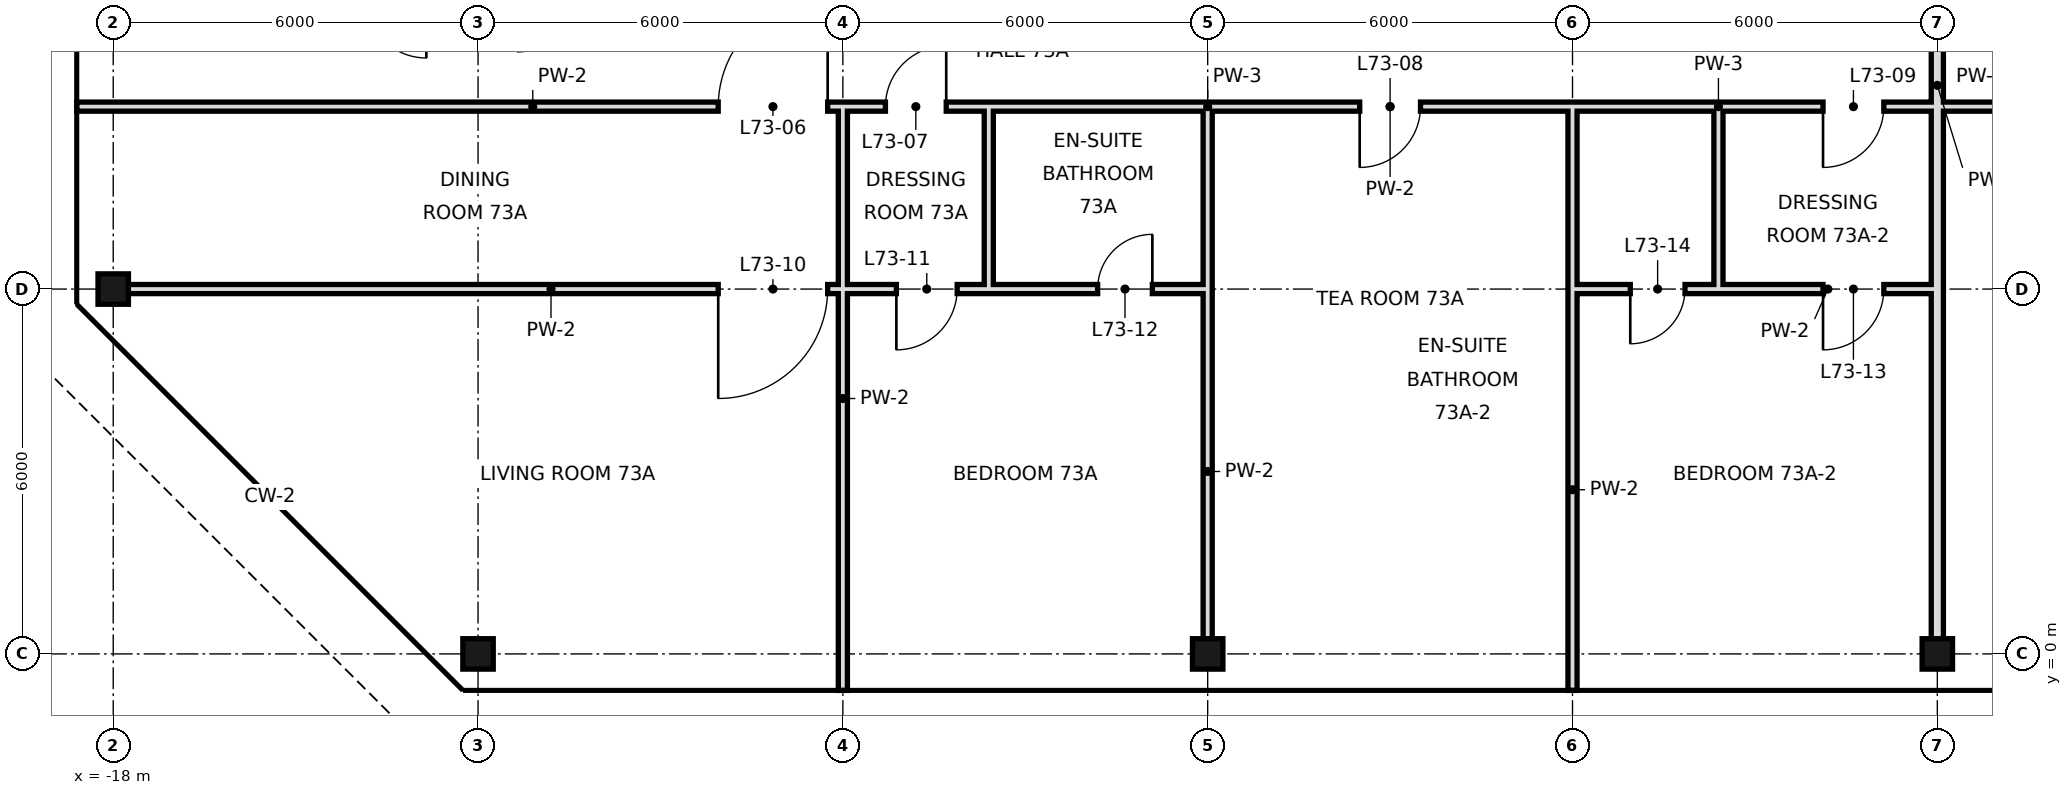
"""IFC4 building model, lengths in metres.
Left out: names, types, materials, properties, quantities, classifications, styles, units other than length and angle.
Written with IfcOpenShell. Run it as: python <this file> out.ifc"""

import sys

from ifc_helpers import new_model, si_unit, direction, frame, frame_2d, origin, origin_2d, place, context, subcontext, project, spatial, rectangle, hollow_rectangle, extrude, element, fill, save


model = new_model("IFC4")
c1 = context("Model", 3, precision=1e-05, world=origin(), true_north=direction((0.0, 1.0)))
c2 = subcontext(c1, "Body", "Model", "MODEL_VIEW")
j1 = project(units=[si_unit("LENGTHUNIT", "METRE"), si_unit("PLANEANGLEUNIT", "RADIAN")], contexts=[c1])
p1 = place(None, origin())
s1 = spatial("IfcSite", under=j1, at=p1, CompositionType="ELEMENT")
p2 = place(p1, origin())
s2 = spatial("IfcBuilding", under=s1, at=p2, CompositionType="ELEMENT")
p3 = place(p2, frame((0.0, 0.0, 308.8)))
s3 = spatial("IfcBuildingStorey", under=s2, at=p3, CompositionType="ELEMENT", Elevation=308.8)
for number, where, z_axis, x_axis in (
    (1, (-18.0, 6.0, 0.0), (0.0, 0.0, 1.0), (1.0, 0.0, 0.0)),
    (2, (-12.0, 0.0, 0.0), (0.0, 0.0, 1.0), (1.0, 0.0, 0.0)),
    (3, (0.0, 0.0, 0.0), (0.0, 0.0, 1.0), (1.0, 0.0, 0.0)),
    (4, (12.0, 0.0, 0.0), (0.0, 0.0, 1.0), (1.0, 0.0, 0.0)),
):
    element("IfcColumn", number, at=place(p3, frame(where, z_axis=z_axis, x_axis=x_axis)), inside=s3, PredefinedType="COLUMN", context=c2, shape_type="SweptSolid", body=[
        extrude(hollow_rectangle(XDim=0.5, YDim=0.5, WallThickness=0.025, at=origin_2d()), origin(), (0.0, 0.0, 1.0), 3.6),
    ])
p4 = place(p3, frame((-3.6, 6.0, 0.0), z_axis=(0.0, 0.0, 1.0), x_axis=(0.0, 1.0, 0.0)))
e5 = element("IfcWall", 5, at=p4, inside=s3, PredefinedType="PARTITIONING", context=c2, shape_type="SweptSolid", body=[
    extrude(rectangle(XDim=3.0, YDim=0.15, at=frame_2d((1.5, 0.0))), origin(), (0.0, 0.0, 1.0), 3.42),
])
p5 = place(p3, frame((-6.0, -0.6, 0.0), z_axis=(0.0, 0.0, 1.0), x_axis=(0.0, 1.0, 0.0)))
e6 = element("IfcWall", 6, at=p5, inside=s3, PredefinedType="PARTITIONING", context=c2, shape_type="SweptSolid", body=[
    extrude(rectangle(XDim=9.6, YDim=0.15, at=frame_2d((4.8, 0.0))), origin(), (0.0, 0.0, 1.0), 3.42),
])
p6 = place(p3, frame((0.0, 0.0, 0.0), z_axis=(0.0, 0.0, 1.0), x_axis=(0.0, 1.0, 0.0)))
e7 = element("IfcWall", 7, at=p6, inside=s3, PredefinedType="PARTITIONING", context=c2, shape_type="SweptSolid", body=[
    extrude(rectangle(XDim=6.0, YDim=0.15, at=frame_2d((3.0, 0.0))), origin(), (0.0, 0.0, 1.0), 2.72),
])
p7 = place(p3, frame((0.0, 6.0, 0.0), z_axis=(0.0, 0.0, 1.0), x_axis=(0.0, 1.0, 0.0)))
e8 = element("IfcWall", 8, at=p7, inside=s3, PredefinedType="PARTITIONING", context=c2, shape_type="SweptSolid", body=[
    extrude(rectangle(XDim=3.0, YDim=0.15, at=frame_2d((1.5, 0.0))), origin(), (0.0, 0.0, 1.0), 2.72),
])
p8 = place(p3, frame((12.0, 0.0, 0.0), z_axis=(0.0, 0.0, 1.0), x_axis=(0.0, 1.0, 0.0)))
e9 = element("IfcWall", 9, at=p8, inside=s3, PredefinedType="SOLIDWALL", context=c2, shape_type="SweptSolid", body=[
    extrude(rectangle(XDim=18.7, YDim=0.2, at=frame_2d((9.35, 0.0))), origin(), (0.0, 0.0, 1.0), 2.72),
])
p9 = place(p3, frame((6.0, -0.6, 0.0), z_axis=(0.0, 0.0, 1.0), x_axis=(0.0, 1.0, 0.0)))
e10 = element("IfcWall", 10, at=p9, inside=s3, PredefinedType="PARTITIONING", context=c2, shape_type="SweptSolid", body=[
    extrude(rectangle(XDim=6.6, YDim=0.15, at=frame_2d((3.3, 0.0))), origin(), (0.0, 0.0, 1.0), 2.72),
])
p10 = place(p3, frame((6.0, 6.0, 0.0), z_axis=(0.0, 0.0, 1.0), x_axis=(0.0, 1.0, 0.0)))
e11 = element("IfcWall", 11, at=p10, inside=s3, PredefinedType="PARTITIONING", context=c2, shape_type="SweptSolid", body=[
    extrude(rectangle(XDim=3.0, YDim=0.15, at=frame_2d((1.5, 0.0))), origin(), (0.0, 0.0, 1.0), 2.72),
])
p11 = place(p3, frame((8.4, 6.0, 0.0), z_axis=(0.0, 0.0, 1.0), x_axis=(0.0, 1.0, 0.0)))
e12 = element("IfcWall", 12, at=p11, inside=s3, PredefinedType="PARTITIONING", context=c2, shape_type="SweptSolid", body=[
    extrude(rectangle(XDim=3.0, YDim=0.15, at=frame_2d((1.5, 0.0))), origin(), (0.0, 0.0, 1.0), 3.42),
])
p12 = place(p3, frame((-18.0, 6.0, 0.0), z_axis=(0.0, 0.0, 1.0), x_axis=(1.0, 0.0, 0.0)))
e13 = element("IfcWall", 13, at=p12, inside=s3, PredefinedType="PARTITIONING", context=c2, shape_type="SweptSolid", body=[
    extrude(rectangle(XDim=14.4, YDim=0.15, at=frame_2d((7.2, 0.0))), origin(), (0.0, 0.0, 1.0), 2.72),
])
p13 = place(p12, frame((9.95, 0.0, 0.0)))
e14 = element("IfcOpeningElement", 14, at=p13, cuts=e13, PredefinedType="OPENING", context=c2, shape_type="SweptSolid", body=[
    extrude(rectangle(XDim=1.8, YDim=2.4, at=frame_2d((0.9, 1.2))), frame((0.0, 0.085, 0.0), z_axis=(0.0, -1.0, 0.0), x_axis=(1.0, 0.0, 0.0)), (0.0, 0.0, 1.0), 0.17),
])
p14 = place(p12, frame((12.88, 0.0, 0.0)))
e15 = element("IfcOpeningElement", 15, at=p14, cuts=e13, PredefinedType="OPENING", context=c2, shape_type="SweptSolid", body=[
    extrude(rectangle(XDim=1.0, YDim=2.4, at=frame_2d((0.5, 1.2))), frame((0.0, 0.085, 0.0), z_axis=(0.0, -1.0, 0.0), x_axis=(1.0, 0.0, 0.0)), (0.0, 0.0, 1.0), 0.17),
])
p15 = place(p3, frame((8.4, 6.0, 0.0), z_axis=(0.0, 0.0, 1.0), x_axis=(1.0, 0.0, 0.0)))
e16 = element("IfcWall", 16, at=p15, inside=s3, PredefinedType="PARTITIONING", context=c2, shape_type="SweptSolid", body=[
    extrude(rectangle(XDim=3.6, YDim=0.15, at=frame_2d((1.8, 0.0))), origin(), (0.0, 0.0, 1.0), 2.97),
])
p16 = place(p15, frame((1.72, 0.0, 0.0)))
e17 = element("IfcOpeningElement", 17, at=p16, cuts=e16, PredefinedType="OPENING", context=c2, shape_type="SweptSolid", body=[
    extrude(rectangle(XDim=1.0, YDim=2.4, at=frame_2d((0.5, 1.2))), frame((0.0, 0.085, 0.0), z_axis=(0.0, -1.0, 0.0), x_axis=(1.0, 0.0, 0.0)), (0.0, 0.0, 1.0), 0.17),
])
p17 = place(p3, frame((-3.6, 6.0, 0.0), z_axis=(0.0, 0.0, 1.0), x_axis=(1.0, 0.0, 0.0)))
e18 = element("IfcWall", 18, at=p17, inside=s3, PredefinedType="PARTITIONING", context=c2, shape_type="SweptSolid", body=[
    extrude(rectangle(XDim=3.6, YDim=0.15, at=frame_2d((1.8, 0.0))), origin(), (0.0, 0.0, 1.0), 2.72),
])
p18 = place(p17, frame((1.79, 0.0, 0.0)))
e19 = element("IfcOpeningElement", 19, at=p18, cuts=e18, PredefinedType="OPENING", context=c2, shape_type="SweptSolid", body=[
    extrude(rectangle(XDim=0.9, YDim=2.4, at=frame_2d((0.45, 1.2))), frame((0.0, 0.085, 0.0), z_axis=(0.0, -1.0, 0.0), x_axis=(1.0, 0.0, 0.0)), (0.0, 0.0, 1.0), 0.17),
])
p19 = place(p3, frame((6.0, 6.0, 0.0), z_axis=(0.0, 0.0, 1.0), x_axis=(1.0, 0.0, 0.0)))
e20 = element("IfcWall", 20, at=p19, inside=s3, PredefinedType="PARTITIONING", context=c2, shape_type="SweptSolid", body=[
    extrude(rectangle(XDim=2.4, YDim=0.15, at=frame_2d((1.2, 0.0))), origin(), (0.0, 0.0, 1.0), 2.97),
])
p20 = place(p19, frame((0.95, 0.0, 0.0)))
e21 = element("IfcOpeningElement", 21, at=p20, cuts=e20, PredefinedType="OPENING", context=c2, shape_type="SweptSolid", body=[
    extrude(rectangle(XDim=0.9, YDim=2.4, at=frame_2d((0.45, 1.2))), frame((0.0, 0.085, 0.0), z_axis=(0.0, -1.0, 0.0), x_axis=(1.0, 0.0, 0.0)), (0.0, 0.0, 1.0), 0.17),
])
p21 = place(p3, frame((-18.6, 9.0, 0.0), z_axis=(0.0, 0.0, 1.0), x_axis=(1.0, 0.0, 0.0)))
e22 = element("IfcWall", 22, at=p21, inside=s3, PredefinedType="PARTITIONING", context=c2, shape_type="SweptSolid", body=[
    extrude(rectangle(XDim=15.0, YDim=0.15, at=frame_2d((7.5, 0.0))), origin(), (0.0, 0.0, 1.0), 3.42),
])
p22 = place(p21, frame((10.55, 0.0, 0.0)))
e23 = element("IfcOpeningElement", 23, at=p22, cuts=e22, PredefinedType="OPENING", context=c2, shape_type="SweptSolid", body=[
    extrude(rectangle(XDim=1.8, YDim=2.4, at=frame_2d((0.9, 1.2))), frame((0.0, 0.085, 0.0), z_axis=(0.0, -1.0, 0.0), x_axis=(1.0, 0.0, 0.0)), (0.0, 0.0, 1.0), 0.17),
])
p23 = place(p21, frame((13.3, 0.0, 0.0)))
e24 = element("IfcOpeningElement", 24, at=p23, cuts=e22, PredefinedType="OPENING", context=c2, shape_type="SweptSolid", body=[
    extrude(rectangle(XDim=1.0, YDim=2.4, at=frame_2d((0.5, 1.2))), frame((0.0, 0.085, 0.0), z_axis=(0.0, -1.0, 0.0), x_axis=(1.0, 0.0, 0.0)), (0.0, 0.0, 1.0), 0.17),
])
p24 = place(p3, frame((0.0, 9.0, 0.0), z_axis=(0.0, 0.0, 1.0), x_axis=(1.0, 0.0, 0.0)))
e25 = element("IfcWall", 25, at=p24, inside=s3, PredefinedType="PARTITIONING", context=c2, shape_type="SweptSolid", body=[
    extrude(rectangle(XDim=6.0, YDim=0.15, at=frame_2d((3.0, 0.0))), origin(), (0.0, 0.0, 1.0), 3.42),
])
p25 = place(p24, frame((2.5, 0.0, 0.0)))
e26 = element("IfcOpeningElement", 26, at=p25, cuts=e25, PredefinedType="OPENING", context=c2, shape_type="SweptSolid", body=[
    extrude(rectangle(XDim=1.0, YDim=2.4, at=frame_2d((0.5, 1.2))), frame((0.0, 0.085, 0.0), z_axis=(0.0, -1.0, 0.0), x_axis=(1.0, 0.0, 0.0)), (0.0, 0.0, 1.0), 0.17),
])
p26 = place(p3, frame((8.4, 9.0, 0.0), z_axis=(0.0, 0.0, 1.0), x_axis=(1.0, 0.0, 0.0)))
e27 = element("IfcWall", 27, at=p26, inside=s3, PredefinedType="PARTITIONING", context=c2, shape_type="SweptSolid", body=[
    extrude(rectangle(XDim=9.6, YDim=0.15, at=frame_2d((4.8, 0.0))), origin(), (0.0, 0.0, 1.0), 3.42),
])
p27 = place(p26, frame((1.72, 0.0, 0.0)))
e28 = element("IfcOpeningElement", 28, at=p27, cuts=e27, PredefinedType="OPENING", context=c2, shape_type="SweptSolid", body=[
    extrude(rectangle(XDim=1.0, YDim=2.4, at=frame_2d((0.5, 1.2))), frame((0.0, 0.085, 0.0), z_axis=(0.0, -1.0, 0.0), x_axis=(1.0, 0.0, 0.0)), (0.0, 0.0, 1.0), 0.17),
])
p28 = place(p26, frame((5.2, 0.0, 0.0)))
e29 = element("IfcOpeningElement", 29, at=p28, cuts=e27, PredefinedType="OPENING", context=c2, shape_type="SweptSolid", body=[
    extrude(rectangle(XDim=1.0, YDim=2.4, at=frame_2d((0.5, 1.2))), frame((0.0, 0.085, 0.0), z_axis=(0.0, -1.0, 0.0), x_axis=(1.0, 0.0, 0.0)), (0.0, 0.0, 1.0), 0.17),
])
p29 = place(p3, frame((-3.6, 9.0, 0.0), z_axis=(0.0, 0.0, 1.0), x_axis=(1.0, 0.0, 0.0)))
e30 = element("IfcWall", 30, at=p29, inside=s3, PredefinedType="PARTITIONING", context=c2, shape_type="SweptSolid", body=[
    extrude(rectangle(XDim=3.6, YDim=0.15, at=frame_2d((1.8, 0.0))), origin(), (0.0, 0.0, 1.0), 3.42),
])
p30 = place(p3, frame((6.0, 9.0, 0.0), z_axis=(0.0, 0.0, 1.0), x_axis=(1.0, 0.0, 0.0)))
e31 = element("IfcWall", 31, at=p30, inside=s3, PredefinedType="PARTITIONING", context=c2, shape_type="SweptSolid", body=[
    extrude(rectangle(XDim=2.4, YDim=0.15, at=frame_2d((1.2, 0.0))), origin(), (0.0, 0.0, 1.0), 3.42),
])
p31 = place(p22, frame((1.8, 0.0, 0.0), z_axis=(0.0, 0.0, 1.0), x_axis=(-1.0, 0.0, 0.0)))
e32 = element("IfcDoor", 32, at=p31, inside=s3, OperationType="SINGLE_SWING_LEFT", PredefinedType="DOOR", context=c2, shape_type="SweptSolid", body=[
    extrude(rectangle(XDim=1.8, YDim=2.4, at=frame_2d((0.9, 1.2))), frame((0.0, 0.025, 0.0), z_axis=(0.0, -1.0, 0.0), x_axis=(1.0, 0.0, 0.0)), (0.0, 0.0, 1.0), 0.05),
])
fill(e23, e32)
p32 = place(p23, frame((1.0, 0.0, 0.0), z_axis=(0.0, 0.0, 1.0), x_axis=(-1.0, 0.0, 0.0)))
e33 = element("IfcDoor", 33, at=p32, inside=s3, OperationType="SINGLE_SWING_LEFT", PredefinedType="DOOR", context=c2, shape_type="SweptSolid", body=[
    extrude(rectangle(XDim=1.0, YDim=2.4, at=frame_2d((0.5, 1.2))), frame((0.0, 0.025, 0.0), z_axis=(0.0, -1.0, 0.0), x_axis=(1.0, 0.0, 0.0)), (0.0, 0.0, 1.0), 0.05),
])
fill(e24, e33)
p33 = place(p25, frame((1.0, 0.0, 0.0), z_axis=(0.0, 0.0, 1.0), x_axis=(-1.0, 0.0, 0.0)))
e34 = element("IfcDoor", 34, at=p33, inside=s3, OperationType="SINGLE_SWING_RIGHT", PredefinedType="DOOR", context=c2, shape_type="SweptSolid", body=[
    extrude(rectangle(XDim=1.0, YDim=2.4, at=frame_2d((0.5, 1.2))), frame((0.0, 0.025, 0.0), z_axis=(0.0, -1.0, 0.0), x_axis=(1.0, 0.0, 0.0)), (0.0, 0.0, 1.0), 0.05),
])
fill(e26, e34)
p34 = place(p27, frame((1.0, 0.0, 0.0), z_axis=(0.0, 0.0, 1.0), x_axis=(-1.0, 0.0, 0.0)))
e35 = element("IfcDoor", 35, at=p34, inside=s3, OperationType="SINGLE_SWING_RIGHT", PredefinedType="DOOR", context=c2, shape_type="SweptSolid", body=[
    extrude(rectangle(XDim=1.0, YDim=2.4, at=frame_2d((0.5, 1.2))), frame((0.0, 0.025, 0.0), z_axis=(0.0, -1.0, 0.0), x_axis=(1.0, 0.0, 0.0)), (0.0, 0.0, 1.0), 0.05),
])
fill(e28, e35)
p35 = place(p13, frame((1.8, 0.0, 0.0), z_axis=(0.0, 0.0, 1.0), x_axis=(-1.0, 0.0, 0.0)))
e36 = element("IfcDoor", 36, at=p35, inside=s3, OperationType="SINGLE_SWING_RIGHT", PredefinedType="DOOR", context=c2, shape_type="SweptSolid", body=[
    extrude(rectangle(XDim=1.8, YDim=2.4, at=frame_2d((0.9, 1.2))), frame((0.0, 0.025, 0.0), z_axis=(0.0, -1.0, 0.0), x_axis=(1.0, 0.0, 0.0)), (0.0, 0.0, 1.0), 0.05),
])
fill(e14, e36)
p36 = place(p14, frame((1.0, 0.0, 0.0), z_axis=(0.0, 0.0, 1.0), x_axis=(-1.0, 0.0, 0.0)))
e37 = element("IfcDoor", 37, at=p36, inside=s3, OperationType="SINGLE_SWING_RIGHT", PredefinedType="DOOR", context=c2, shape_type="SweptSolid", body=[
    extrude(rectangle(XDim=1.0, YDim=2.4, at=frame_2d((0.5, 1.2))), frame((0.0, 0.025, 0.0), z_axis=(0.0, -1.0, 0.0), x_axis=(1.0, 0.0, 0.0)), (0.0, 0.0, 1.0), 0.05),
])
fill(e15, e37)
p37 = place(p18, frame((0.9, 0.0, 0.0), z_axis=(0.0, 0.0, 1.0), x_axis=(-1.0, 0.0, 0.0)))
e38 = element("IfcDoor", 38, at=p37, inside=s3, OperationType="SINGLE_SWING_LEFT", PredefinedType="DOOR", context=c2, shape_type="SweptSolid", body=[
    extrude(rectangle(XDim=0.9, YDim=2.4, at=frame_2d((0.45, 1.2))), frame((0.0, 0.025, 0.0), z_axis=(0.0, -1.0, 0.0), x_axis=(1.0, 0.0, 0.0)), (0.0, 0.0, 1.0), 0.05),
])
fill(e19, e38)
p38 = place(p16, frame((1.0, 0.0, 0.0), z_axis=(0.0, 0.0, 1.0), x_axis=(-1.0, 0.0, 0.0)))
e39 = element("IfcDoor", 39, at=p38, inside=s3, OperationType="SINGLE_SWING_RIGHT", PredefinedType="DOOR", context=c2, shape_type="SweptSolid", body=[
    extrude(rectangle(XDim=1.0, YDim=2.4, at=frame_2d((0.5, 1.2))), frame((0.0, 0.025, 0.0), z_axis=(0.0, -1.0, 0.0), x_axis=(1.0, 0.0, 0.0)), (0.0, 0.0, 1.0), 0.05),
])
fill(e17, e39)
p39 = place(p20, frame((0.9, 0.0, 0.0), z_axis=(0.0, 0.0, 1.0), x_axis=(-1.0, 0.0, 0.0)))
e40 = element("IfcDoor", 40, at=p39, inside=s3, OperationType="SINGLE_SWING_RIGHT", PredefinedType="DOOR", context=c2, shape_type="SweptSolid", body=[
    extrude(rectangle(XDim=0.9, YDim=2.4, at=frame_2d((0.45, 1.2))), frame((0.0, 0.025, 0.0), z_axis=(0.0, -1.0, 0.0), x_axis=(1.0, 0.0, 0.0)), (0.0, 0.0, 1.0), 0.05),
])
fill(e21, e40)
save(model, sys.argv[1])
